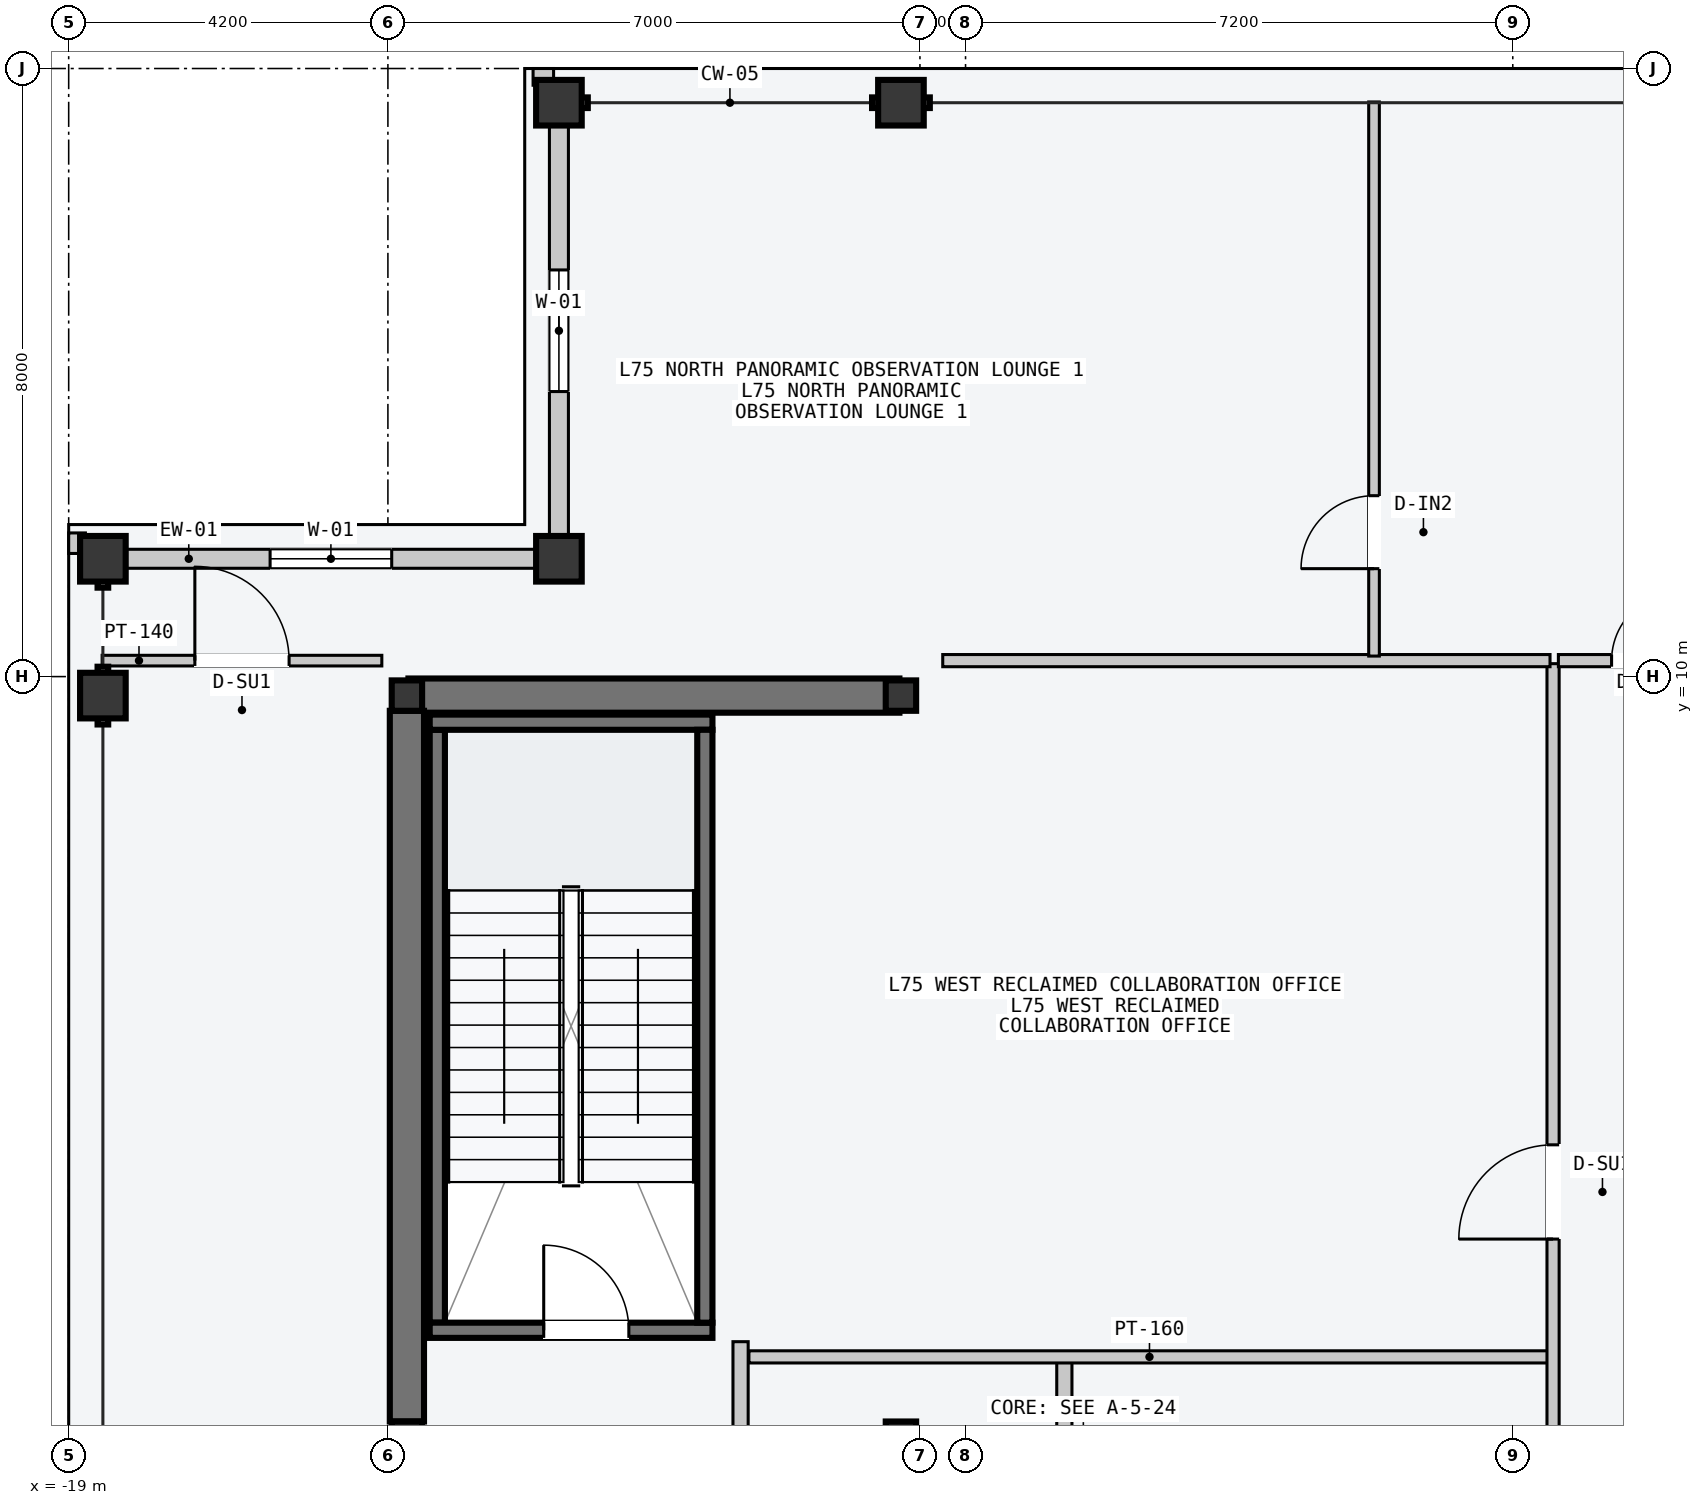
"""IFC4 building model, lengths in metres.
Left out: names, types, materials, properties, quantities, classifications, styles, units other than length and angle.
Written with IfcOpenShell. Run it as: python <this file> out.ifc"""

import sys

from ifc_helpers import new_model, si_unit, direction, frame, frame_2d, origin, origin_2d, place, context, subcontext, project, spatial, rectangle, hollow_rectangle, i_section, extrude, element, fill, save


model = new_model("IFC4")
c1 = context("Model", 3, precision=1e-05, world=origin(), true_north=direction((0.0, 1.0)))
c2 = subcontext(c1, "Body", "Model", "MODEL_VIEW")
j1 = project(units=[si_unit("LENGTHUNIT", "METRE"), si_unit("PLANEANGLEUNIT", "RADIAN")], contexts=[c1])
p1 = place(None, origin())
s1 = spatial("IfcSite", under=j1, at=p1, CompositionType="ELEMENT")
p2 = place(p1, origin())
s2 = spatial("IfcBuilding", under=s1, at=p2, CompositionType="ELEMENT")
p3 = place(p2, frame((0.0, 0.0, 284.4)))
s3 = spatial("IfcBuildingStorey", under=s2, at=p3, CompositionType="ELEMENT", Elevation=284.4)
p4 = place(p3, frame((-14.53, 9.75, -0.2), z_axis=(0.0, 0.0, 1.0), x_axis=(1.0, 0.0, 0.0)))
e1 = element("IfcWall", 1, at=p4, inside=s3, PredefinedType="SHEAR", context=c2, shape_type="SweptSolid", body=[
    extrude(rectangle(XDim=6.46, YDim=0.45, at=frame_2d((3.23, 0.0))), origin(), (0.0, 0.0, 1.0), 4.8),
])
p5 = place(p3, frame((-14.55, 0.2, -0.2), z_axis=(0.0, 0.0, 1.0), x_axis=(0.0, 1.0, 0.0)))
e2 = element("IfcWall", 2, at=p5, inside=s3, PredefinedType="SHEAR", context=c2, shape_type="SweptSolid", body=[
    extrude(rectangle(XDim=9.35, YDim=0.45, at=frame_2d((4.675, 0.0))), origin(), (0.0, 0.0, 1.0), 4.8),
])
p6 = place(p3, frame((-14.15, 1.5, -0.2), z_axis=(0.0, 0.0, 1.0), x_axis=(0.0, 1.0, 0.0)))
e3 = element("IfcWall", 3, at=p6, inside=s3, PredefinedType="SOLIDWALL", context=c2, shape_type="SweptSolid", body=[
    extrude(rectangle(XDim=7.8, YDim=0.2, at=frame_2d((3.9, 0.0))), origin(), (0.0, 0.0, 1.0), 4.8),
])
p7 = place(p3, frame((-14.25, 1.4, -0.2), z_axis=(0.0, 0.0, 1.0), x_axis=(1.0, 0.0, 0.0)))
e4 = element("IfcWall", 4, at=p7, inside=s3, PredefinedType="SOLIDWALL", context=c2, shape_type="SweptSolid", body=[
    extrude(rectangle(XDim=3.72, YDim=0.2, at=frame_2d((1.86, 0.0))), origin(), (0.0, 0.0, 1.0), 4.8),
])
p8 = place(p7, frame((1.5, 0.0, 0.2)))
e5 = element("IfcOpeningElement", 5, at=p8, cuts=e4, PredefinedType="OPENING", context=c2, shape_type="SweptSolid", body=[
    extrude(rectangle(XDim=1.12, YDim=2.18, at=frame_2d((0.56, 1.09))), frame((0.0, 0.11, 0.0), z_axis=(0.0, -1.0, 0.0), x_axis=(1.0, 0.0, 0.0)), (0.0, 0.0, 1.0), 0.22),
])
p9 = place(p3, frame((-14.25, 9.4, -0.2), z_axis=(0.0, 0.0, 1.0), x_axis=(1.0, 0.0, 0.0)))
e6 = element("IfcWall", 6, at=p9, inside=s3, PredefinedType="SOLIDWALL", context=c2, shape_type="SweptSolid", body=[
    extrude(rectangle(XDim=3.72, YDim=0.2, at=frame_2d((1.86, 0.0))), origin(), (0.0, 0.0, 1.0), 4.8),
])
p10 = place(p3, frame((-10.63, 1.5, -0.2), z_axis=(0.0, 0.0, 1.0), x_axis=(0.0, 1.0, 0.0)))
e7 = element("IfcWall", 7, at=p10, inside=s3, PredefinedType="SOLIDWALL", context=c2, shape_type="SweptSolid", body=[
    extrude(rectangle(XDim=7.8, YDim=0.2, at=frame_2d((3.9, 0.0))), origin(), (0.0, 0.0, 1.0), 4.8),
])
for number, where, z_axis, x_axis in (
    (8, (-14.55, 0.0, 0.0), (0.0, 0.0, 1.0), (1.0, 0.0, 0.0)),
    (9, (-14.55, 9.75, 0.0), (0.0, 0.0, 1.0), (1.0, 0.0, 0.0)),
    (10, (-8.05, 0.0, 0.0), (0.0, 0.0, 1.0), (1.0, 0.0, 0.0)),
    (11, (-8.05, 9.75, 0.0), (0.0, 0.0, 1.0), (1.0, 0.0, 0.0)),
):
    element("IfcColumn", number, at=place(p3, frame(where, z_axis=z_axis, x_axis=x_axis)), inside=s3, PredefinedType="COLUMN", context=c2, shape_type="SweptSolid", body=[
        extrude(i_section(OverallWidth=0.4, OverallDepth=0.4, WebThickness=0.013, FlangeThickness=0.021, at=origin_2d()), origin(), (0.0, 0.0, 1.0), 4.8),
    ])
for number, where, z_axis, x_axis in (
    (12, (-12.55, 17.55, 0.0), (0.0, 0.0, 1.0), (1.0, 0.0, 0.0)),
    (13, (-8.05, 17.55, 0.0), (0.0, 0.0, 1.0), (1.0, 0.0, 0.0)),
    (14, (-18.55, 9.75, 0.0), (0.0, 0.0, 1.0), (0.0, 1.0, 0.0)),
    (15, (-18.55, 11.55, 0.0), (0.0, 0.0, 1.0), (0.0, 1.0, 0.0)),
    (16, (-12.55, 11.55, 0.0), (0.0, 0.0, 1.0), (1.0, 0.0, 0.0)),
):
    element("IfcColumn", number, at=place(p3, frame(where, z_axis=z_axis, x_axis=x_axis)), inside=s3, PredefinedType="COLUMN", context=c2, shape_type="SweptSolid", body=[
        extrude(hollow_rectangle(XDim=0.6, YDim=0.6, WallThickness=0.025, at=origin_2d()), origin(), (0.0, 0.0, 1.0), 4.8),
    ])
p11 = place(p3, frame((-18.24, 11.55, 0.0), z_axis=(0.0, 0.0, 1.0), x_axis=(1.0, 0.0, 0.0)))
e17 = element("IfcWall", 17, at=p11, inside=s3, PredefinedType="STANDARD", context=c2, shape_type="SweptSolid", body=[
    extrude(rectangle(XDim=5.38, YDim=0.25, at=frame_2d((2.69, 0.0))), origin(), (0.0, 0.0, 1.0), 4.05),
])
p12 = place(p11, frame((1.89, 0.0, 0.85)))
e18 = element("IfcOpeningElement", 18, at=p12, cuts=e17, PredefinedType="OPENING", context=c2, shape_type="SweptSolid", body=[
    extrude(rectangle(XDim=1.6, YDim=2.0, at=frame_2d((0.8, 1.0))), frame((0.0, 0.135, 0.0), z_axis=(0.0, -1.0, 0.0), x_axis=(1.0, 0.0, 0.0)), (0.0, 0.0, 1.0), 0.27),
])
p13 = place(p3, frame((-12.55, 11.86, 0.0), z_axis=(0.0, 0.0, 1.0), x_axis=(0.0, 1.0, 0.0)))
e19 = element("IfcWall", 19, at=p13, inside=s3, PredefinedType="STANDARD", context=c2, shape_type="SweptSolid", body=[
    extrude(rectangle(XDim=5.38, YDim=0.25, at=frame_2d((2.69, 0.0))), origin(), (0.0, 0.0, 1.0), 4.05),
])
p14 = place(p13, frame((1.89, 0.0, 0.85)))
e20 = element("IfcOpeningElement", 20, at=p14, cuts=e19, PredefinedType="OPENING", context=c2, shape_type="SweptSolid", body=[
    extrude(rectangle(XDim=1.6, YDim=2.0, at=frame_2d((0.8, 1.0))), frame((0.0, 0.135, 0.0), z_axis=(0.0, -1.0, 0.0), x_axis=(1.0, 0.0, 0.0)), (0.0, 0.0, 1.0), 0.27),
])
for number, where, z_axis, x_axis in (
    (21, (-12.89, 17.89, 0.0), (0.0, 0.0, 1.0), (1.0, 0.0, 0.0)),
    (22, (-18.89, 11.62, 0.0), (0.0, 0.0, 1.0), (0.0, 1.0, 0.0)),
):
    element("IfcWall", number, at=place(p3, frame(where, z_axis=z_axis, x_axis=x_axis)), inside=s3, PredefinedType="PARAPET", context=c2, shape_type="SweptSolid", body=[
        extrude(rectangle(XDim=0.27, YDim=0.22, at=frame_2d((0.135, 0.0))), origin(), (0.0, 0.0, 1.0), 1.2),
    ])
p15 = place(p3, frame((-5.9, -9.45, 0.0), z_axis=(0.0, 0.0, 1.0), x_axis=(0.0, 1.0, 0.0)))
e23 = element("IfcWall", 23, at=p15, inside=s3, PredefinedType="PARTITIONING", context=c2, shape_type="SweptSolid", body=[
    extrude(rectangle(XDim=10.5, YDim=0.2, at=frame_2d((5.25, 0.0))), origin(), (0.0, 0.0, 1.0), 4.6),
])
p16 = place(p15, frame((3.9, 0.0, 0.0)))
e24 = element("IfcOpeningElement", 24, at=p16, cuts=e23, PredefinedType="OPENING", context=c2, shape_type="SweptSolid", body=[
    extrude(rectangle(XDim=1.5, YDim=2.2, at=frame_2d((0.75, 1.1))), frame((0.0, 0.11, 0.0), z_axis=(0.0, -1.0, 0.0), x_axis=(1.0, 0.0, 0.0)), (0.0, 0.0, 1.0), 0.22),
])
p17 = place(p3, frame((-10.16, -2.55, 0.0), z_axis=(0.0, 0.0, 1.0), x_axis=(0.0, 1.0, 0.0)))
e25 = element("IfcWall", 25, at=p17, inside=s3, PredefinedType="PARTITIONING", context=c2, shape_type="SweptSolid", body=[
    extrude(rectangle(XDim=3.8, YDim=0.2, at=frame_2d((1.9, 0.0))), origin(), (0.0, 0.0, 1.0), 4.6),
])
p18 = place(p17, frame((1.3, 0.0, 0.0)))
e26 = element("IfcOpeningElement", 26, at=p18, cuts=e25, PredefinedType="OPENING", context=c2, shape_type="SweptSolid", body=[
    extrude(rectangle(XDim=1.1, YDim=2.15, at=frame_2d((0.55, 1.075))), frame((0.0, 0.11, 0.0), z_axis=(0.0, -1.0, 0.0), x_axis=(1.0, 0.0, 0.0)), (0.0, 0.0, 1.0), 0.22),
])
p19 = place(p3, frame((-10.05, 1.05, 0.0), z_axis=(0.0, 0.0, 1.0), x_axis=(1.0, 0.0, 0.0)))
e27 = element("IfcWall", 27, at=p19, inside=s3, PredefinedType="PARTITIONING", context=c2, shape_type="SweptSolid", body=[
    extrude(rectangle(XDim=10.54, YDim=0.16, at=frame_2d((5.27, 0.0))), origin(), (0.0, 0.0, 1.0), 4.6),
])
p20 = place(p3, frame((0.53, -3.5, 0.0), z_axis=(0.0, 0.0, 1.0), x_axis=(0.0, 1.0, 0.0)))
e28 = element("IfcWall", 28, at=p20, inside=s3, PredefinedType="PARTITIONING", context=c2, shape_type="SweptSolid", body=[
    extrude(rectangle(XDim=13.67, YDim=0.16, at=frame_2d((6.835, 0.0))), origin(), (0.0, 0.0, 1.0), 4.6),
])
p21 = place(p20, frame((6.1, 0.0, 0.0)))
e29 = element("IfcOpeningElement", 29, at=p21, cuts=e28, PredefinedType="OPENING", context=c2, shape_type="SweptSolid", body=[
    extrude(rectangle(XDim=1.24, YDim=2.24, at=frame_2d((0.62, 1.12))), frame((0.0, 0.09, 0.0), z_axis=(0.0, -1.0, 0.0), x_axis=(1.0, 0.0, 0.0)), (0.0, 0.0, 1.0), 0.18),
])
p22 = place(p20, frame((1.6, 0.0, 0.0)))
e30 = element("IfcOpeningElement", 30, at=p22, cuts=e28, PredefinedType="OPENING", context=c2, shape_type="SweptSolid", body=[
    extrude(rectangle(XDim=0.96, YDim=2.18, at=frame_2d((0.48, 1.09))), frame((0.0, 0.09, 0.0), z_axis=(0.0, -1.0, 0.0), x_axis=(1.0, 0.0, 0.0)), (0.0, 0.0, 1.0), 0.18),
])
p23 = place(p3, frame((-7.5, 10.21, 0.0), z_axis=(0.0, 0.0, 1.0), x_axis=(1.0, 0.0, 0.0)))
e31 = element("IfcWall", 31, at=p23, inside=s3, PredefinedType="PARTITIONING", context=c2, shape_type="SweptSolid", body=[
    extrude(rectangle(XDim=7.99, YDim=0.16, at=frame_2d((3.995, 0.0))), origin(), (0.0, 0.0, 1.0), 4.6),
])
p24 = place(p3, frame((-1.826, 10.27, 0.0), z_axis=(0.0, 0.0, 1.0), x_axis=(0.0, 1.0, 0.0)))
e32 = element("IfcWall", 32, at=p24, inside=s3, PredefinedType="PARTITIONING", context=c2, shape_type="SweptSolid", body=[
    extrude(rectangle(XDim=7.29, YDim=0.14, at=frame_2d((3.645, 0.0))), origin(), (0.0, 0.0, 1.0), 4.6),
])
p25 = place(p24, frame((1.15, 0.0, 0.0)))
e33 = element("IfcOpeningElement", 33, at=p25, cuts=e32, PredefinedType="OPENING", context=c2, shape_type="SweptSolid", body=[
    extrude(rectangle(XDim=0.96, YDim=2.18, at=frame_2d((0.48, 1.09))), frame((0.0, 0.08, 0.0), z_axis=(0.0, -1.0, 0.0), x_axis=(1.0, 0.0, 0.0)), (0.0, 0.0, 1.0), 0.16),
])
p26 = place(p3, frame((0.6, 10.21, 0.0), z_axis=(0.0, 0.0, 1.0), x_axis=(1.0, 0.0, 0.0)))
e34 = element("IfcWall", 34, at=p26, inside=s3, PredefinedType="PARTITIONING", context=c2, shape_type="SweptSolid", body=[
    extrude(rectangle(XDim=2.3, YDim=0.16, at=frame_2d((1.15, 0.0))), origin(), (0.0, 0.0, 1.0), 4.6),
])
p27 = place(p26, frame((0.7, 0.0, 0.0)))
e35 = element("IfcOpeningElement", 35, at=p27, cuts=e34, PredefinedType="OPENING", context=c2, shape_type="SweptSolid", body=[
    extrude(rectangle(XDim=0.9, YDim=2.15, at=frame_2d((0.45, 1.075))), frame((0.0, 0.09, 0.0), z_axis=(0.0, -1.0, 0.0), x_axis=(1.0, 0.0, 0.0)), (0.0, 0.0, 1.0), 0.18),
])
p28 = place(p3, frame((-18.56, 10.21, 0.0), z_axis=(0.0, 0.0, 1.0), x_axis=(1.0, 0.0, 0.0)))
e36 = element("IfcWall", 36, at=p28, inside=s3, PredefinedType="PARTITIONING", context=c2, shape_type="SweptSolid", body=[
    extrude(rectangle(XDim=3.68, YDim=0.14, at=frame_2d((1.84, 0.0))), origin(), (0.0, 0.0, 1.0), 4.6),
])
p29 = place(p28, frame((1.22, 0.0, 0.0)))
e37 = element("IfcOpeningElement", 37, at=p29, cuts=e36, PredefinedType="OPENING", context=c2, shape_type="SweptSolid", body=[
    extrude(rectangle(XDim=1.24, YDim=2.24, at=frame_2d((0.62, 1.12))), frame((0.0, 0.08, 0.0), z_axis=(0.0, -1.0, 0.0), x_axis=(1.0, 0.0, 0.0)), (0.0, 0.0, 1.0), 0.16),
])
p30 = place(p8, origin())
e38 = element("IfcDoor", 38, at=p30, inside=s3, OperationType="SINGLE_SWING_LEFT", PredefinedType="DOOR", context=c2, shape_type="SweptSolid", body=[
    extrude(rectangle(XDim=1.12, YDim=2.18, at=frame_2d((0.56, 1.09))), frame((0.0, 0.025, 0.0), z_axis=(0.0, -1.0, 0.0), x_axis=(1.0, 0.0, 0.0)), (0.0, 0.0, 1.0), 0.05),
])
fill(e5, e38)
p31 = place(p12, origin())
e39 = element("IfcWindow", 39, at=p31, inside=s3, PartitioningType="SINGLE_PANEL", PredefinedType="WINDOW", context=c2, shape_type="SweptSolid", body=[
    extrude(rectangle(XDim=1.6, YDim=2.0, at=frame_2d((0.8, 1.0))), frame((0.0, 0.03, 0.0), z_axis=(0.0, -1.0, 0.0), x_axis=(1.0, 0.0, 0.0)), (0.0, 0.0, 1.0), 0.06),
])
fill(e18, e39)
p32 = place(p14, origin())
e40 = element("IfcWindow", 40, at=p32, inside=s3, PartitioningType="SINGLE_PANEL", PredefinedType="WINDOW", context=c2, shape_type="SweptSolid", body=[
    extrude(rectangle(XDim=1.6, YDim=2.0, at=frame_2d((0.8, 1.0))), frame((0.0, 0.03, 0.0), z_axis=(0.0, -1.0, 0.0), x_axis=(1.0, 0.0, 0.0)), (0.0, 0.0, 1.0), 0.06),
])
fill(e20, e40)
p33 = place(p21, origin())
e41 = element("IfcDoor", 41, at=p33, inside=s3, OperationType="SINGLE_SWING_LEFT", PredefinedType="DOOR", context=c2, shape_type="SweptSolid", body=[
    extrude(rectangle(XDim=1.24, YDim=2.24, at=frame_2d((0.62, 1.12))), frame((0.0, 0.025, 0.0), z_axis=(0.0, -1.0, 0.0), x_axis=(1.0, 0.0, 0.0)), (0.0, 0.0, 1.0), 0.05),
])
fill(e29, e41)
p34 = place(p25, origin())
e42 = element("IfcDoor", 42, at=p34, inside=s3, OperationType="SINGLE_SWING_LEFT", PredefinedType="DOOR", context=c2, shape_type="SweptSolid", body=[
    extrude(rectangle(XDim=0.96, YDim=2.18, at=frame_2d((0.48, 1.09))), frame((0.0, 0.025, 0.0), z_axis=(0.0, -1.0, 0.0), x_axis=(1.0, 0.0, 0.0)), (0.0, 0.0, 1.0), 0.05),
])
fill(e33, e42)
p35 = place(p27, origin())
e43 = element("IfcDoor", 43, at=p35, inside=s3, OperationType="SINGLE_SWING_RIGHT", PredefinedType="DOOR", context=c2, shape_type="SweptSolid", body=[
    extrude(rectangle(XDim=0.9, YDim=2.15, at=frame_2d((0.45, 1.075))), frame((0.0, 0.025, 0.0), z_axis=(0.0, -1.0, 0.0), x_axis=(1.0, 0.0, 0.0)), (0.0, 0.0, 1.0), 0.05),
])
fill(e35, e43)
p36 = place(p29, origin())
e44 = element("IfcDoor", 44, at=p36, inside=s3, OperationType="SINGLE_SWING_LEFT", PredefinedType="DOOR", context=c2, shape_type="SweptSolid", body=[
    extrude(rectangle(XDim=1.24, YDim=2.24, at=frame_2d((0.62, 1.12))), frame((0.0, 0.025, 0.0), z_axis=(0.0, -1.0, 0.0), x_axis=(1.0, 0.0, 0.0)), (0.0, 0.0, 1.0), 0.05),
])
fill(e37, e44)
save(model, sys.argv[1])
